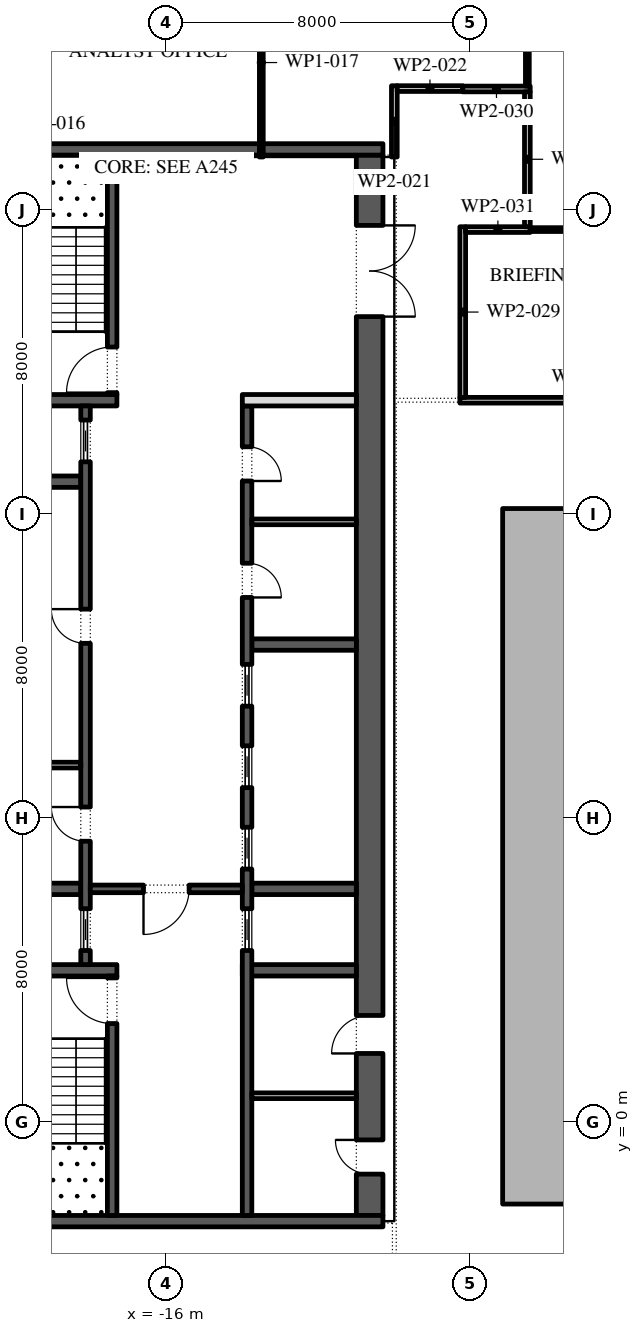
"""IFC4 building model, lengths in metres.
Left out: names, types, materials, properties, quantities, classifications, styles, units other than length and angle.
Written with IfcOpenShell. Run it as: python <this file> out.ifc"""

import sys

from ifc_helpers import new_model, si_unit, direction, frame, frame_2d, origin, place, context, subcontext, project, spatial, polyline, rectangle, outline, extrude, element, fill, save


model = new_model("IFC4")
c1 = context("Model", 3, precision=1e-05, world=origin(), true_north=direction((0.0, 1.0)))
c2 = subcontext(c1, "Body", "Model", "MODEL_VIEW")
j1 = project(units=[si_unit("LENGTHUNIT", "METRE"), si_unit("PLANEANGLEUNIT", "RADIAN")], contexts=[c1])
p1 = place(None, origin())
s1 = spatial("IfcSite", under=j1, at=p1, CompositionType="ELEMENT")
p2 = place(p1, origin())
s2 = spatial("IfcBuilding", under=s1, at=p2, CompositionType="ELEMENT")
p3 = place(p2, frame((0.0, 0.0, 192.6)))
s3 = spatial("IfcBuildingStorey", under=s2, at=p3, CompositionType="ELEMENT", Elevation=192.6)
p4 = place(p3, origin())
e1 = element("IfcWall", 1, at=p4, inside=s3, PredefinedType="STANDARD", context=c2, shape_type="SweptSolid", body=[
    extrude(outline(polyline([(-7.15, -2.15), (7.15, -2.15), (7.15, 16.15), (-7.15, 16.15), (-7.15, -2.15)]), holes=[polyline([(-7.0, -2.0), (-7.0, 16.0), (7.0, 16.0), (7.0, -2.0), (-7.0, -2.0)])]), origin(), (0.0, 0.0, 1.0), 4.0),
])
p5 = place(p3, frame((-10.65, -2.45, 0.0), z_axis=(0.0, 0.0, 1.0), x_axis=(0.0, 1.0, 0.0)))
e2 = element("IfcWall", 2, at=p5, inside=s3, PredefinedType="SHEAR", context=c2, shape_type="SweptSolid", body=[
    extrude(rectangle(XDim=27.9, YDim=0.7, at=frame_2d((13.95, 0.0))), origin(), (0.0, 0.0, 1.0), 4.0),
])
p6 = place(p5, frame((23.65, 0.0, 0.0)))
e3 = element("IfcOpeningElement", 3, at=p6, cuts=e2, PredefinedType="OPENING", context=c2, shape_type="SweptSolid", body=[
    extrude(rectangle(XDim=2.4, YDim=2.1, at=frame_2d((1.2, 1.05))), frame((0.0, 0.36, 0.0), z_axis=(0.0, -1.0, 0.0), x_axis=(1.0, 0.0, 0.0)), (0.0, 0.0, 1.0), 0.72),
])
p7 = place(p5, frame((1.087, 0.0, 0.0)))
e4 = element("IfcOpeningElement", 4, at=p7, cuts=e2, PredefinedType="OPENING", context=c2, shape_type="SweptSolid", body=[
    extrude(rectangle(XDim=0.9, YDim=2.1, at=frame_2d((0.45, 1.05))), frame((0.0, 0.36, 0.0), z_axis=(0.0, -1.0, 0.0), x_axis=(1.0, 0.0, 0.0)), (0.0, 0.0, 1.0), 0.72),
])
p8 = place(p5, frame((4.262, 0.0, 0.0)))
e5 = element("IfcOpeningElement", 5, at=p8, cuts=e2, PredefinedType="OPENING", context=c2, shape_type="SweptSolid", body=[
    extrude(rectangle(XDim=1.0, YDim=2.1, at=frame_2d((0.5, 1.05))), frame((0.0, 0.36, 0.0), z_axis=(0.0, -1.0, 0.0), x_axis=(1.0, 0.0, 0.0)), (0.0, 0.0, 1.0), 0.72),
])
for number, where, z_axis, x_axis in (
    (6, (-21.7, -2.6, 0.0), (0.0, 0.0, 1.0), (1.0, 0.0, 0.0)),
    (7, (-21.7, 25.6, 0.0), (0.0, 0.0, 1.0), (1.0, 0.0, 0.0)),
):
    element("IfcWall", number, at=place(p3, frame(where, z_axis=z_axis, x_axis=x_axis)), inside=s3, PredefinedType="SHEAR", context=c2, shape_type="SweptSolid", body=[
        extrude(rectangle(XDim=11.4, YDim=0.3, at=frame_2d((5.7, 0.0))), origin(), (0.0, 0.0, 1.0), 4.0),
    ])
p9 = place(p3, frame((-21.0, 4.0, 0.0), z_axis=(0.0, 0.0, 1.0), x_axis=(1.0, 0.0, 0.0)))
e8 = element("IfcWall", 8, at=p9, inside=s3, PredefinedType="SHEAR", context=c2, shape_type="SweptSolid", body=[
    extrude(rectangle(XDim=3.7, YDim=0.3, at=frame_2d((1.85, 0.0))), origin(), (0.0, 0.0, 1.0), 4.0),
])
p10 = place(p3, frame((-17.425, -2.45, 0.0), z_axis=(0.0, 0.0, 1.0), x_axis=(0.0, 1.0, 0.0)))
e9 = element("IfcWall", 9, at=p10, inside=s3, PredefinedType="SHEAR", context=c2, shape_type="SweptSolid", body=[
    extrude(rectangle(XDim=6.3, YDim=0.25, at=frame_2d((3.15, 0.0))), origin(), (0.0, 0.0, 1.0), 4.0),
])
p11 = place(p10, frame((5.05, 0.0, 0.0)))
e10 = element("IfcOpeningElement", 10, at=p11, cuts=e9, PredefinedType="OPENING", context=c2, shape_type="SweptSolid", body=[
    extrude(rectangle(XDim=1.2, YDim=2.1, at=frame_2d((0.6, 1.05))), frame((0.0, 0.135, 0.0), z_axis=(0.0, -1.0, 0.0), x_axis=(1.0, 0.0, 0.0)), (0.0, 0.0, 1.0), 0.27),
])
p12 = place(p3, frame((-21.0, 19.0, 0.0), z_axis=(0.0, 0.0, 1.0), x_axis=(1.0, 0.0, 0.0)))
e11 = element("IfcWall", 11, at=p12, inside=s3, PredefinedType="SHEAR", context=c2, shape_type="SweptSolid", body=[
    extrude(rectangle(XDim=3.7, YDim=0.3, at=frame_2d((1.85, 0.0))), origin(), (0.0, 0.0, 1.0), 4.0),
])
p13 = place(p3, frame((-17.425, 19.15, 0.0), z_axis=(0.0, 0.0, 1.0), x_axis=(0.0, 1.0, 0.0)))
e12 = element("IfcWall", 12, at=p13, inside=s3, PredefinedType="SHEAR", context=c2, shape_type="SweptSolid", body=[
    extrude(rectangle(XDim=6.3, YDim=0.25, at=frame_2d((3.15, 0.0))), origin(), (0.0, 0.0, 1.0), 4.0),
])
p14 = place(p13, frame((0.05, 0.0, 0.0)))
e13 = element("IfcOpeningElement", 13, at=p14, cuts=e12, PredefinedType="OPENING", context=c2, shape_type="SweptSolid", body=[
    extrude(rectangle(XDim=1.2, YDim=2.1, at=frame_2d((0.6, 1.05))), frame((0.0, 0.135, 0.0), z_axis=(0.0, -1.0, 0.0), x_axis=(1.0, 0.0, 0.0)), (0.0, 0.0, 1.0), 0.27),
])
for number, where, z_axis, x_axis in (
    (14, (-21.0, 6.143, 0.0), (0.0, 0.0, 1.0), (1.0, 0.0, 0.0)),
    (15, (-21.0, 16.857, 0.0), (0.0, 0.0, 1.0), (1.0, 0.0, 0.0)),
):
    element("IfcWall", number, at=place(p3, frame(where, z_axis=z_axis, x_axis=x_axis)), inside=s3, PredefinedType="SHEAR", context=c2, shape_type="SweptSolid", body=[
        extrude(rectangle(XDim=2.75, YDim=0.3, at=frame_2d((1.375, 0.0))), origin(), (0.0, 0.0, 1.0), 4.0),
    ])
p15 = place(p3, frame((-18.125, 4.15, 0.0), z_axis=(0.0, 0.0, 1.0), x_axis=(0.0, 1.0, 0.0)))
e16 = element("IfcWall", 16, at=p15, inside=s3, PredefinedType="SHEAR", context=c2, shape_type="SweptSolid", body=[
    extrude(rectangle(XDim=14.7, YDim=0.25, at=frame_2d((7.35, 0.0))), origin(), (0.0, 0.0, 1.0), 4.0),
])
p16 = place(p15, frame((3.246, 0.0, 0.0)))
e17 = element("IfcOpeningElement", 17, at=p16, cuts=e16, PredefinedType="OPENING", context=c2, shape_type="SweptSolid", body=[
    extrude(rectangle(XDim=0.9, YDim=2.1, at=frame_2d((0.45, 1.05))), frame((0.0, 0.135, 0.0), z_axis=(0.0, -1.0, 0.0), x_axis=(1.0, 0.0, 0.0)), (0.0, 0.0, 1.0), 0.27),
])
p17 = place(p15, frame((8.454, 0.0, 0.0)))
e18 = element("IfcOpeningElement", 18, at=p17, cuts=e16, PredefinedType="OPENING", context=c2, shape_type="SweptSolid", body=[
    extrude(rectangle(XDim=0.9, YDim=2.1, at=frame_2d((0.45, 1.05))), frame((0.0, 0.135, 0.0), z_axis=(0.0, -1.0, 0.0), x_axis=(1.0, 0.0, 0.0)), (0.0, 0.0, 1.0), 0.27),
])
p18 = place(p15, frame((0.371, 0.0, 0.0)))
e19 = element("IfcOpeningElement", 19, at=p18, cuts=e16, PredefinedType="OPENING", context=c2, shape_type="SweptSolid", body=[
    extrude(rectangle(XDim=1.1, YDim=2.1, at=frame_2d((0.55, 1.05))), frame((0.0, 0.135, 0.0), z_axis=(0.0, -1.0, 0.0), x_axis=(1.0, 0.0, 0.0)), (0.0, 0.0, 1.0), 0.27),
])
p19 = place(p15, frame((13.229, 0.0, 0.0)))
e20 = element("IfcOpeningElement", 20, at=p19, cuts=e16, PredefinedType="OPENING", context=c2, shape_type="SweptSolid", body=[
    extrude(rectangle(XDim=1.1, YDim=2.1, at=frame_2d((0.55, 1.05))), frame((0.0, 0.135, 0.0), z_axis=(0.0, -1.0, 0.0), x_axis=(1.0, 0.0, 0.0)), (0.0, 0.0, 1.0), 0.27),
])
p20 = place(p3, frame((-21.0, 9.4, 0.0), z_axis=(0.0, 0.0, 1.0), x_axis=(1.0, 0.0, 0.0)))
e21 = element("IfcWall", 21, at=p20, inside=s3, PredefinedType="PARTITIONING", context=c2, shape_type="SweptSolid", body=[
    extrude(rectangle(XDim=2.75, YDim=0.15, at=frame_2d((1.375, 0.0))), origin(), (0.0, 0.0, 1.0), 4.0),
])
p21 = place(p3, frame((-14.0, 4.0, 0.0), z_axis=(0.0, 0.0, 1.0), x_axis=(1.0, 0.0, 0.0)))
e22 = element("IfcWall", 22, at=p21, inside=s3, PredefinedType="SHEAR", context=c2, shape_type="SweptSolid", body=[
    extrude(rectangle(XDim=3.0, YDim=0.3, at=frame_2d((1.5, 0.0))), origin(), (0.0, 0.0, 1.0), 4.0),
])
for number, where, z_axis, x_axis in (
    (23, (-13.75, 6.143, 0.0), (0.0, 0.0, 1.0), (1.0, 0.0, 0.0)),
    (24, (-13.75, 12.571, 0.0), (0.0, 0.0, 1.0), (1.0, 0.0, 0.0)),
):
    element("IfcWall", number, at=place(p3, frame(where, z_axis=z_axis, x_axis=x_axis)), inside=s3, PredefinedType="SHEAR", context=c2, shape_type="SweptSolid", body=[
        extrude(rectangle(XDim=2.75, YDim=0.3, at=frame_2d((1.375, 0.0))), origin(), (0.0, 0.0, 1.0), 4.0),
    ])
p22 = place(p3, frame((-13.875, -2.45, 0.0), z_axis=(0.0, 0.0, 1.0), x_axis=(0.0, 1.0, 0.0)))
e25 = element("IfcWall", 25, at=p22, inside=s3, PredefinedType="SHEAR", context=c2, shape_type="SweptSolid", body=[
    extrude(rectangle(XDim=21.3, YDim=0.25, at=frame_2d((10.65, 0.0))), origin(), (0.0, 0.0, 1.0), 4.0),
])
p23 = place(p22, frame((16.261, 0.0, 0.0)))
e26 = element("IfcOpeningElement", 26, at=p23, cuts=e25, PredefinedType="OPENING", context=c2, shape_type="SweptSolid", body=[
    extrude(rectangle(XDim=0.9, YDim=2.1, at=frame_2d((0.45, 1.05))), frame((0.0, 0.135, 0.0), z_axis=(0.0, -1.0, 0.0), x_axis=(1.0, 0.0, 0.0)), (0.0, 0.0, 1.0), 0.27),
])
p24 = place(p22, frame((19.325, 0.0, 0.0)))
e27 = element("IfcOpeningElement", 27, at=p24, cuts=e25, PredefinedType="OPENING", context=c2, shape_type="SweptSolid", body=[
    extrude(rectangle(XDim=0.9, YDim=2.1, at=frame_2d((0.45, 1.05))), frame((0.0, 0.135, 0.0), z_axis=(0.0, -1.0, 0.0), x_axis=(1.0, 0.0, 0.0)), (0.0, 0.0, 1.0), 0.27),
])
p25 = place(p22, frame((6.971, 0.0, 0.0)))
e28 = element("IfcOpeningElement", 28, at=p25, cuts=e25, PredefinedType="OPENING", context=c2, shape_type="SweptSolid", body=[
    extrude(rectangle(XDim=1.1, YDim=2.1, at=frame_2d((0.55, 1.05))), frame((0.0, 0.135, 0.0), z_axis=(0.0, -1.0, 0.0), x_axis=(1.0, 0.0, 0.0)), (0.0, 0.0, 1.0), 0.27),
])
p26 = place(p22, frame((9.114, 0.0, 0.0)))
e29 = element("IfcOpeningElement", 29, at=p26, cuts=e25, PredefinedType="OPENING", context=c2, shape_type="SweptSolid", body=[
    extrude(rectangle(XDim=1.1, YDim=2.1, at=frame_2d((0.55, 1.05))), frame((0.0, 0.135, 0.0), z_axis=(0.0, -1.0, 0.0), x_axis=(1.0, 0.0, 0.0)), (0.0, 0.0, 1.0), 0.27),
])
p27 = place(p22, frame((11.257, 0.0, 0.0)))
e30 = element("IfcOpeningElement", 30, at=p27, cuts=e25, PredefinedType="OPENING", context=c2, shape_type="SweptSolid", body=[
    extrude(rectangle(XDim=1.1, YDim=2.1, at=frame_2d((0.55, 1.05))), frame((0.0, 0.135, 0.0), z_axis=(0.0, -1.0, 0.0), x_axis=(1.0, 0.0, 0.0)), (0.0, 0.0, 1.0), 0.27),
])
p28 = place(p22, frame((13.4, 0.0, 0.0)))
e31 = element("IfcOpeningElement", 31, at=p28, cuts=e25, PredefinedType="OPENING", context=c2, shape_type="SweptSolid", body=[
    extrude(rectangle(XDim=1.1, YDim=2.1, at=frame_2d((0.55, 1.05))), frame((0.0, 0.135, 0.0), z_axis=(0.0, -1.0, 0.0), x_axis=(1.0, 0.0, 0.0)), (0.0, 0.0, 1.0), 0.27),
])
p29 = place(p3, frame((-14.0, 19.0, 0.0), z_axis=(0.0, 0.0, 1.0), x_axis=(1.0, 0.0, 0.0)))
e32 = element("IfcWall", 32, at=p29, inside=s3, PredefinedType="PARTITIONING", context=c2, shape_type="SweptSolid", body=[
    extrude(rectangle(XDim=3.0, YDim=0.3, at=frame_2d((1.5, 0.0))), origin(), (0.0, 0.0, 1.0), 4.0),
])
p30 = place(p3, frame((-13.75, 15.8, 0.0), z_axis=(0.0, 0.0, 1.0), x_axis=(1.0, 0.0, 0.0)))
e33 = element("IfcWall", 33, at=p30, inside=s3, PredefinedType="PARTITIONING", context=c2, shape_type="SweptSolid", body=[
    extrude(rectangle(XDim=2.75, YDim=0.15, at=frame_2d((1.375, 0.0))), origin(), (0.0, 0.0, 1.0), 4.0),
])
p31 = place(p3, frame((-18.0, 6.143, 0.0), z_axis=(0.0, 0.0, 1.0), x_axis=(1.0, 0.0, 0.0)))
e34 = element("IfcWall", 34, at=p31, inside=s3, PredefinedType="SHEAR", context=c2, shape_type="SweptSolid", body=[
    extrude(rectangle(XDim=4.0, YDim=0.2, at=frame_2d((2.0, 0.0))), origin(), (0.0, 0.0, 1.0), 4.0),
])
p32 = place(p31, frame((1.4, 0.0, 0.0)))
e35 = element("IfcOpeningElement", 35, at=p32, cuts=e34, PredefinedType="OPENING", context=c2, shape_type="SweptSolid", body=[
    extrude(rectangle(XDim=1.2, YDim=2.1, at=frame_2d((0.6, 1.05))), frame((0.0, 0.11, 0.0), z_axis=(0.0, -1.0, 0.0), x_axis=(1.0, 0.0, 0.0)), (0.0, 0.0, 1.0), 0.22),
])
p33 = place(p3, frame((-13.75, 0.7, 0.0), z_axis=(0.0, 0.0, 1.0), x_axis=(1.0, 0.0, 0.0)))
e36 = element("IfcWall", 36, at=p33, inside=s3, PredefinedType="PARTITIONING", context=c2, shape_type="SweptSolid", body=[
    extrude(rectangle(XDim=2.75, YDim=0.15, at=frame_2d((1.375, 0.0))), origin(), (0.0, 0.0, 1.0), 4.0),
])
p34 = place(p3, frame((-13.5, 30.37, 0.0), z_axis=(0.0, 0.0, 1.0), x_axis=(0.0, -1.0, 0.0)))
e37 = element("IfcWall", 37, at=p34, inside=s3, PredefinedType="PARTITIONING", context=c2, shape_type="SweptSolid", body=[
    extrude(rectangle(XDim=4.97, YDim=0.1, at=frame_2d((2.485, 0.0))), origin(), (0.0, 0.0, 1.0), 4.0),
])
p35 = place(p3, frame((-10.0, 25.4, 0.0), z_axis=(0.0, 0.0, 1.0), x_axis=(0.0, 1.0, 0.0)))
e38 = element("IfcWall", 38, at=p35, inside=s3, PredefinedType="PARTITIONING", context=c2, shape_type="SweptSolid", body=[
    extrude(rectangle(XDim=1.875, YDim=0.15, at=frame_2d((0.938, 0.0))), origin(), (0.0, 0.0, 1.0), 4.0),
])
p36 = place(p3, frame((-9.925, 27.2, 0.0), z_axis=(0.0, 0.0, 1.0), x_axis=(1.0, 0.0, 0.0)))
e39 = element("IfcWall", 39, at=p36, inside=s3, PredefinedType="PARTITIONING", context=c2, shape_type="SweptSolid", body=[
    extrude(rectangle(XDim=1.725, YDim=0.15, at=frame_2d((0.863, 0.0))), origin(), (0.0, 0.0, 1.0), 4.0),
])
p37 = place(p3, frame((-8.275, 19.0, 0.0), z_axis=(0.0, 0.0, 1.0), x_axis=(1.0, 0.0, 0.0)))
e40 = element("IfcWall", 40, at=p37, inside=s3, PredefinedType="PARTITIONING", context=c2, shape_type="SweptSolid", body=[
    extrude(rectangle(XDim=7.36, YDim=0.15, at=frame_2d((3.68, 0.0))), origin(), (0.0, 0.0, 1.0), 4.0),
])
p38 = place(p37, frame((4.635, 0.0, 0.0)))
e41 = element("IfcOpeningElement", 41, at=p38, cuts=e40, PredefinedType="OPENING", context=c2, shape_type="SweptSolid", body=[
    extrude(rectangle(XDim=1.0, YDim=2.1, at=frame_2d((0.5, 1.05))), frame((0.0, 0.085, 0.0), z_axis=(0.0, -1.0, 0.0), x_axis=(1.0, 0.0, 0.0)), (0.0, 0.0, 1.0), 0.17),
])
p39 = place(p3, frame((-8.2, 23.565, 0.0), z_axis=(0.0, 0.0, 1.0), x_axis=(0.0, -1.0, 0.0)))
e42 = element("IfcWall", 42, at=p39, inside=s3, PredefinedType="PARTITIONING", context=c2, shape_type="SweptSolid", body=[
    extrude(rectangle(XDim=4.49, YDim=0.15, at=frame_2d((2.245, 0.0))), origin(), (0.0, 0.0, 1.0), 4.0),
])
p40 = place(p3, frame((-8.2, 27.19, 0.0), z_axis=(0.0, 0.0, 1.0), x_axis=(1.0, 0.0, 0.0)))
e43 = element("IfcWall", 43, at=p40, inside=s3, PredefinedType="PARTITIONING", context=c2, shape_type="SweptSolid", body=[
    extrude(rectangle(XDim=1.775, YDim=0.15, at=frame_2d((0.887, 0.0))), origin(), (0.0, 0.0, 1.0), 4.0),
])
p41 = place(p3, frame((-6.425, 23.49, 0.0), z_axis=(0.0, 0.0, 1.0), x_axis=(-1.0, 0.0, 0.0)))
e44 = element("IfcWall", 44, at=p41, inside=s3, PredefinedType="PARTITIONING", context=c2, shape_type="SweptSolid", body=[
    extrude(rectangle(XDim=1.7, YDim=0.15, at=frame_2d((0.85, 0.0))), origin(), (0.0, 0.0, 1.0), 4.0),
])
p42 = place(p3, frame((-6.425, 23.49, 0.0), z_axis=(0.0, 0.0, 1.0), x_axis=(1.0, 0.0, 0.0)))
e45 = element("IfcWall", 45, at=p42, inside=s3, PredefinedType="PARTITIONING", context=c2, shape_type="SweptSolid", body=[
    extrude(rectangle(XDim=5.51, YDim=0.1, at=frame_2d((2.755, 0.0))), origin(), (0.0, 0.0, 1.0), 4.0),
])
p43 = place(p3, frame((-6.5, 27.115, 0.0), z_axis=(0.0, 0.0, 1.0), x_axis=(0.0, -1.0, 0.0)))
e46 = element("IfcWall", 46, at=p43, inside=s3, PredefinedType="PARTITIONING", context=c2, shape_type="SweptSolid", body=[
    extrude(rectangle(XDim=3.55, YDim=0.15, at=frame_2d((1.775, 0.0))), origin(), (0.0, 0.0, 1.0), 4.0),
])
p44 = place(p3, frame((-6.5, 30.37, 0.0), z_axis=(0.0, 0.0, 1.0), x_axis=(0.0, -1.0, 0.0)))
e47 = element("IfcWall", 47, at=p44, inside=s3, PredefinedType="PARTITIONING", context=c2, shape_type="SweptSolid", body=[
    extrude(rectangle(XDim=3.105, YDim=0.1, at=frame_2d((1.553, 0.0))), origin(), (0.0, 0.0, 1.0), 4.0),
])
p45 = place(p16, origin())
e48 = element("IfcDoor", 48, at=p45, inside=s3, OperationType="SINGLE_SWING_LEFT", PredefinedType="DOOR", context=c2, shape_type="SweptSolid", body=[
    extrude(rectangle(XDim=0.9, YDim=2.1, at=frame_2d((0.45, 1.05))), frame((0.0, 0.125, 0.0), z_axis=(0.0, -1.0, 0.0), x_axis=(1.0, 0.0, 0.0)), (0.0, 0.0, 1.0), 0.05),
])
fill(e17, e48)
p46 = place(p17, origin())
e49 = element("IfcDoor", 49, at=p46, inside=s3, OperationType="SINGLE_SWING_LEFT", PredefinedType="DOOR", context=c2, shape_type="SweptSolid", body=[
    extrude(rectangle(XDim=0.9, YDim=2.1, at=frame_2d((0.45, 1.05))), frame((0.0, 0.125, 0.0), z_axis=(0.0, -1.0, 0.0), x_axis=(1.0, 0.0, 0.0)), (0.0, 0.0, 1.0), 0.05),
])
fill(e18, e49)
p47 = place(p18, origin())
e50 = element("IfcDoor", 50, at=p47, inside=s3, OperationType="SLIDING_TO_LEFT", PredefinedType="DOOR", context=c2, shape_type="SweptSolid", body=[
    extrude(rectangle(XDim=1.1, YDim=2.1, at=frame_2d((0.55, 1.05))), frame((0.0, 0.025, 0.0), z_axis=(0.0, -1.0, 0.0), x_axis=(1.0, 0.0, 0.0)), (0.0, 0.0, 1.0), 0.05),
])
fill(e19, e50)
p48 = place(p19, origin())
e51 = element("IfcDoor", 51, at=p48, inside=s3, OperationType="SLIDING_TO_LEFT", PredefinedType="DOOR", context=c2, shape_type="SweptSolid", body=[
    extrude(rectangle(XDim=1.1, YDim=2.1, at=frame_2d((0.55, 1.05))), frame((0.0, 0.025, 0.0), z_axis=(0.0, -1.0, 0.0), x_axis=(1.0, 0.0, 0.0)), (0.0, 0.0, 1.0), 0.05),
])
fill(e20, e51)
p49 = place(p23, frame((0.9, -0.2, 0.0), z_axis=(0.0, 0.0, 1.0), x_axis=(-1.0, 0.0, 0.0)))
e52 = element("IfcDoor", 52, at=p49, inside=s3, OperationType="SINGLE_SWING_LEFT", PredefinedType="DOOR", context=c2, shape_type="SweptSolid", body=[
    extrude(rectangle(XDim=0.9, YDim=2.1, at=frame_2d((0.45, 1.05))), frame((0.0, -0.075, 0.0), z_axis=(0.0, -1.0, 0.0), x_axis=(1.0, 0.0, 0.0)), (0.0, 0.0, 1.0), 0.05),
])
fill(e26, e52)
p50 = place(p24, frame((0.9, -0.2, 0.0), z_axis=(0.0, 0.0, 1.0), x_axis=(-1.0, 0.0, 0.0)))
e53 = element("IfcDoor", 53, at=p50, inside=s3, OperationType="SINGLE_SWING_LEFT", PredefinedType="DOOR", context=c2, shape_type="SweptSolid", body=[
    extrude(rectangle(XDim=0.9, YDim=2.1, at=frame_2d((0.45, 1.05))), frame((0.0, -0.075, 0.0), z_axis=(0.0, -1.0, 0.0), x_axis=(1.0, 0.0, 0.0)), (0.0, 0.0, 1.0), 0.05),
])
fill(e27, e53)
p51 = place(p25, origin())
e54 = element("IfcDoor", 54, at=p51, inside=s3, OperationType="SLIDING_TO_LEFT", PredefinedType="DOOR", context=c2, shape_type="SweptSolid", body=[
    extrude(rectangle(XDim=1.1, YDim=2.1, at=frame_2d((0.55, 1.05))), frame((0.0, 0.025, 0.0), z_axis=(0.0, -1.0, 0.0), x_axis=(1.0, 0.0, 0.0)), (0.0, 0.0, 1.0), 0.05),
])
fill(e28, e54)
p52 = place(p26, origin())
e55 = element("IfcDoor", 55, at=p52, inside=s3, OperationType="SLIDING_TO_LEFT", PredefinedType="DOOR", context=c2, shape_type="SweptSolid", body=[
    extrude(rectangle(XDim=1.1, YDim=2.1, at=frame_2d((0.55, 1.05))), frame((0.0, 0.025, 0.0), z_axis=(0.0, -1.0, 0.0), x_axis=(1.0, 0.0, 0.0)), (0.0, 0.0, 1.0), 0.05),
])
fill(e29, e55)
p53 = place(p27, origin())
e56 = element("IfcDoor", 56, at=p53, inside=s3, OperationType="SLIDING_TO_LEFT", PredefinedType="DOOR", context=c2, shape_type="SweptSolid", body=[
    extrude(rectangle(XDim=1.1, YDim=2.1, at=frame_2d((0.55, 1.05))), frame((0.0, 0.025, 0.0), z_axis=(0.0, -1.0, 0.0), x_axis=(1.0, 0.0, 0.0)), (0.0, 0.0, 1.0), 0.05),
])
fill(e30, e56)
p54 = place(p28, origin())
e57 = element("IfcDoor", 57, at=p54, inside=s3, OperationType="SLIDING_TO_LEFT", PredefinedType="DOOR", context=c2, shape_type="SweptSolid", body=[
    extrude(rectangle(XDim=1.1, YDim=2.1, at=frame_2d((0.55, 1.05))), frame((0.0, 0.025, 0.0), z_axis=(0.0, -1.0, 0.0), x_axis=(1.0, 0.0, 0.0)), (0.0, 0.0, 1.0), 0.05),
])
fill(e31, e57)
p55 = place(p32, frame((1.2, 0.0, 0.0), z_axis=(0.0, 0.0, 1.0), x_axis=(-1.0, 0.0, 0.0)))
e58 = element("IfcDoor", 58, at=p55, inside=s3, OperationType="SINGLE_SWING_LEFT", PredefinedType="DOOR", context=c2, shape_type="SweptSolid", body=[
    extrude(rectangle(XDim=1.2, YDim=2.1, at=frame_2d((0.6, 1.05))), frame((0.0, 0.025, 0.0), z_axis=(0.0, -1.0, 0.0), x_axis=(1.0, 0.0, 0.0)), (0.0, 0.0, 1.0), 0.05),
])
fill(e35, e58)
p56 = place(p6, frame((2.4, 0.0, 0.0), z_axis=(0.0, 0.0, 1.0), x_axis=(-1.0, 0.0, 0.0)))
e59 = element("IfcDoor", 59, at=p56, inside=s3, OperationType="DOUBLE_DOOR_SINGLE_SWING", PredefinedType="DOOR", context=c2, shape_type="SweptSolid", body=[
    extrude(rectangle(XDim=2.4, YDim=2.1, at=frame_2d((1.2, 1.05))), frame((0.0, 0.025, 0.0), z_axis=(0.0, -1.0, 0.0), x_axis=(1.0, 0.0, 0.0)), (0.0, 0.0, 1.0), 0.05),
])
fill(e3, e59)
p57 = place(p11, origin())
e60 = element("IfcDoor", 60, at=p57, inside=s3, OperationType="SINGLE_SWING_LEFT", PredefinedType="DOOR", context=c2, shape_type="SweptSolid", body=[
    extrude(rectangle(XDim=1.2, YDim=2.1, at=frame_2d((0.6, 1.05))), frame((0.0, 0.025, 0.0), z_axis=(0.0, -1.0, 0.0), x_axis=(1.0, 0.0, 0.0)), (0.0, 0.0, 1.0), 0.05),
])
fill(e10, e60)
p58 = place(p14, origin())
e61 = element("IfcDoor", 61, at=p58, inside=s3, OperationType="SINGLE_SWING_RIGHT", PredefinedType="DOOR", context=c2, shape_type="SweptSolid", body=[
    extrude(rectangle(XDim=1.2, YDim=2.1, at=frame_2d((0.6, 1.05))), frame((0.0, 0.025, 0.0), z_axis=(0.0, -1.0, 0.0), x_axis=(1.0, 0.0, 0.0)), (0.0, 0.0, 1.0), 0.05),
])
fill(e13, e61)
p59 = place(p7, origin())
e62 = element("IfcDoor", 62, at=p59, inside=s3, OperationType="SINGLE_SWING_LEFT", PredefinedType="DOOR", context=c2, shape_type="SweptSolid", body=[
    extrude(rectangle(XDim=0.9, YDim=2.1, at=frame_2d((0.45, 1.05))), frame((0.0, 0.35, 0.0), z_axis=(0.0, -1.0, 0.0), x_axis=(1.0, 0.0, 0.0)), (0.0, 0.0, 1.0), 0.05),
])
fill(e4, e62)
p60 = place(p8, origin())
e63 = element("IfcDoor", 63, at=p60, inside=s3, OperationType="SINGLE_SWING_RIGHT", PredefinedType="DOOR", context=c2, shape_type="SweptSolid", body=[
    extrude(rectangle(XDim=1.0, YDim=2.1, at=frame_2d((0.5, 1.05))), frame((0.0, 0.35, 0.0), z_axis=(0.0, -1.0, 0.0), x_axis=(1.0, 0.0, 0.0)), (0.0, 0.0, 1.0), 0.05),
])
fill(e5, e63)
save(model, sys.argv[1])
